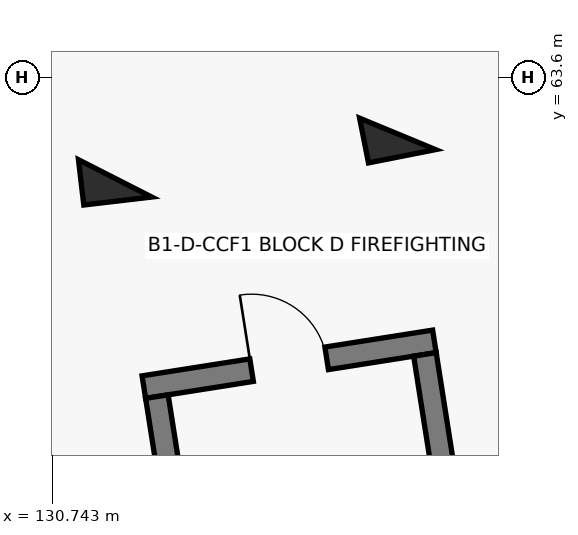
"""IFC4 building model, lengths in metres.
Left out: names, types, materials, properties, quantities, classifications, styles, units other than length and angle.
Written with IfcOpenShell. Run it as: python <this file> out.ifc"""

import sys

from ifc_helpers import new_model, si_unit, direction, frame, frame_2d, origin, origin_2d, place, context, subcontext, project, spatial, rectangle, extrude, element, fill, save


model = new_model("IFC4")
c1 = context("Model", 3, precision=1e-05, world=origin(), true_north=direction((0.0, 1.0)))
c2 = subcontext(c1, "Body", "Model", "MODEL_VIEW")
j1 = project(units=[si_unit("LENGTHUNIT", "METRE"), si_unit("PLANEANGLEUNIT", "RADIAN")], contexts=[c1])
p1 = place(None, origin())
s1 = spatial("IfcSite", under=j1, at=p1, CompositionType="ELEMENT")
p2 = place(p1, origin())
s2 = spatial("IfcBuilding", under=s1, at=p2, CompositionType="ELEMENT")
p3 = place(p2, frame((0.0, 0.0, -3.6)))
s3 = spatial("IfcBuildingStorey", under=s2, at=p3, CompositionType="ELEMENT", Elevation=-3.6)
for number, where, z_axis, x_axis in (
    (1, (131.571, 62.267, 0.0), (0.0, 0.0, 1.0), (0.117, -0.993, 0.0)),
    (2, (135.288, 62.853, 0.0), (0.0, 0.0, 1.0), (0.194, -0.981, 0.0)),
):
    element("IfcColumn", number, at=place(p3, frame(where, z_axis=z_axis, x_axis=x_axis)), inside=s3, PredefinedType="COLUMN", context=c2, shape_type="SweptSolid", body=[
        extrude(rectangle(XDim=0.6, YDim=0.9, at=origin_2d()), origin(), (0.0, 0.0, 1.0), 3.6),
    ])
p4 = place(p3, frame((131.949, 59.521, 0.0), z_axis=(0.0, 0.0, 1.0), x_axis=(0.98782579805, 0.155564111245, 0.0)))
e3 = element("IfcWall", 3, at=p4, inside=s3, PredefinedType="SHEAR", context=c2, shape_type="SweptSolid", body=[
    extrude(rectangle(XDim=3.87, YDim=0.3, at=frame_2d((1.935, 0.0))), origin(), (0.0, 0.0, 1.0), 3.6),
])
p5 = place(p4, frame((1.435, 0.0, 0.0)))
e4 = element("IfcOpeningElement", 4, at=p5, cuts=e3, PredefinedType="OPENING", context=c2, shape_type="SweptSolid", body=[
    extrude(rectangle(XDim=1.0, YDim=2.15, at=frame_2d((0.5, 1.075))), frame((0.0, 0.16, 0.0), z_axis=(0.0, -1.0, 0.0), x_axis=(1.0, 0.0, 0.0)), (0.0, 0.0, 1.0), 0.32),
])
p6 = place(p3, frame((132.121, 59.396, 0.0), z_axis=(0.0, 0.0, 1.0), x_axis=(0.155563141844, -0.987825950712, 0.0)))
e5 = element("IfcWall", 5, at=p6, inside=s3, PredefinedType="SHEAR", context=c2, shape_type="SweptSolid", body=[
    extrude(rectangle(XDim=7.69, YDim=0.3, at=frame_2d((3.845, 0.0))), origin(), (0.0, 0.0, 1.0), 3.6),
])
p7 = place(p3, frame((135.647, 59.951, 0.0), z_axis=(0.0, 0.0, 1.0), x_axis=(0.155568020624, -0.987825182388, 0.0)))
e6 = element("IfcWall", 6, at=p7, inside=s3, PredefinedType="SHEAR", context=c2, shape_type="SweptSolid", body=[
    extrude(rectangle(XDim=7.69, YDim=0.3, at=frame_2d((3.845, 0.0))), origin(), (0.0, 0.0, 1.0), 3.6),
])
p8 = place(p5, origin())
e7 = element("IfcDoor", 7, at=p8, inside=s3, OperationType="SINGLE_SWING_LEFT", PredefinedType="DOOR", context=c2, shape_type="SweptSolid", body=[
    extrude(rectangle(XDim=1.0, YDim=2.15, at=frame_2d((0.5, 1.075))), frame((0.0, 0.025, 0.0), z_axis=(0.0, -1.0, 0.0), x_axis=(1.0, 0.0, 0.0)), (0.0, 0.0, 1.0), 0.05),
])
fill(e4, e7)
save(model, sys.argv[1])
